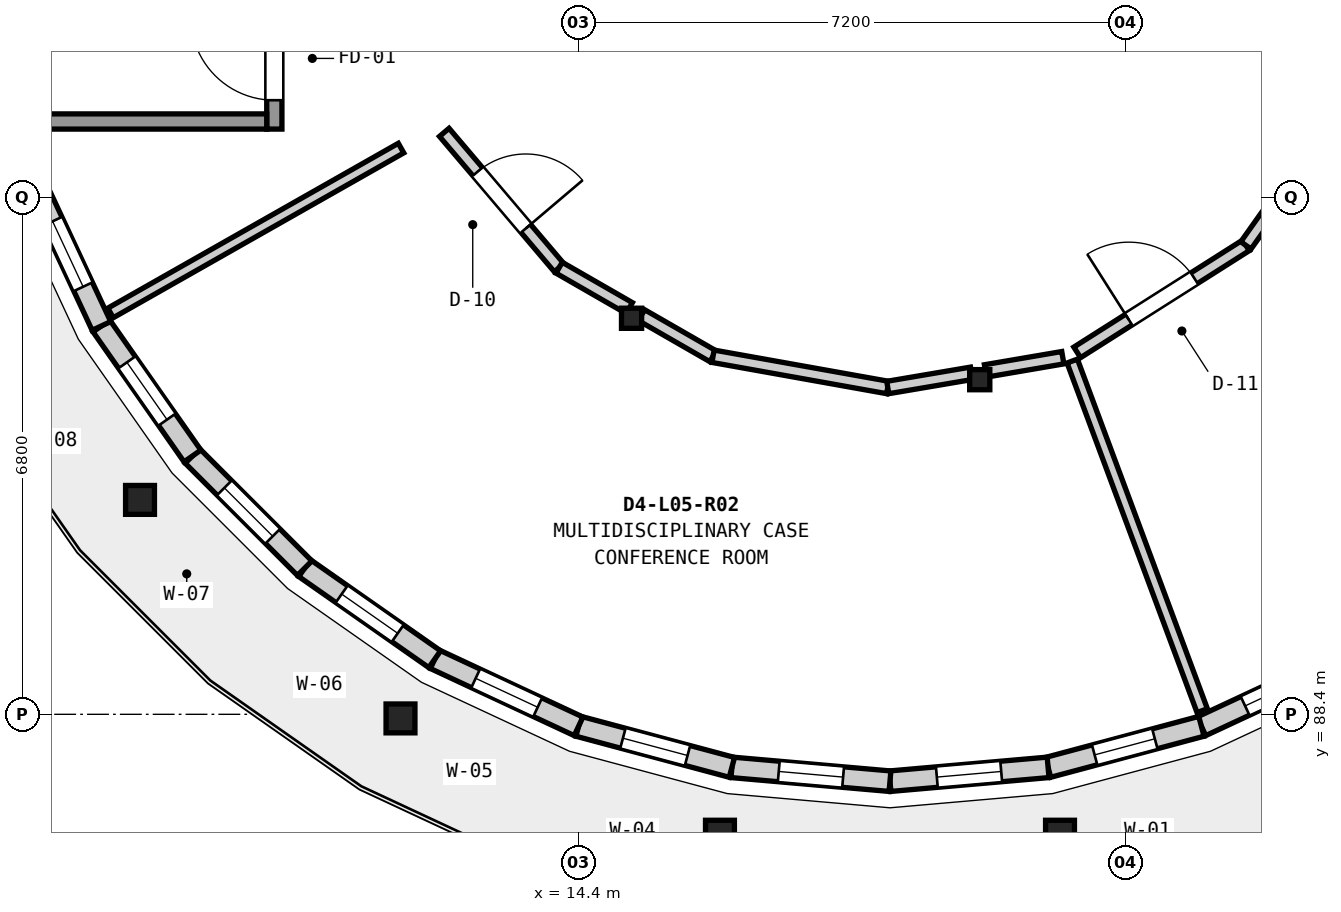
"""IFC4 building model, lengths in metres.
Left out: names, types, materials, properties, quantities, classifications, styles, units other than length and angle.
Written with IfcOpenShell. Run it as: python <this file> out.ifc"""

import sys

from ifc_helpers import new_model, si_unit, direction, frame, frame_2d, origin, origin_2d, place, context, subcontext, project, spatial, rectangle, circle, extrude, element, fill, save


model = new_model("IFC4")
c1 = context("Model", 3, precision=1e-05, world=origin(), true_north=direction((0.0, 1.0)))
c2 = subcontext(c1, "Body", "Model", "MODEL_VIEW")
j1 = project(units=[si_unit("LENGTHUNIT", "METRE"), si_unit("PLANEANGLEUNIT", "RADIAN")], contexts=[c1])
p1 = place(None, origin())
s1 = spatial("IfcSite", under=j1, at=p1, CompositionType="ELEMENT")
p2 = place(p1, origin())
s2 = spatial("IfcBuilding", under=s1, at=p2, CompositionType="ELEMENT")
p3 = place(p2, frame((0.0, 0.0, 21.35)))
s3 = spatial("IfcBuildingStorey", under=s2, at=p3, CompositionType="ELEMENT", Elevation=21.35)
for number, where, z_axis, x_axis in (
    (1, (8.633, 91.221, 0.0), (0.0, 0.0, 1.0), (1.0, 0.0, 0.0)),
    (2, (12.06, 88.346, 0.0), (0.0, 0.0, 1.0), (1.0, 0.0, 0.0)),
    (3, (16.263, 86.816, 0.0), (0.0, 0.0, 1.0), (1.0, 0.0, 0.0)),
    (4, (20.737, 86.816, 0.0), (0.0, 0.0, 1.0), (1.0, 0.0, 0.0)),
):
    element("IfcColumn", number, at=place(p3, frame(where, z_axis=z_axis, x_axis=x_axis)), inside=s3, PredefinedType="PILASTER", context=c2, shape_type="SweptSolid", body=[
        extrude(circle(Radius=0.19, at=origin_2d()), origin(), (0.0, 0.0, 1.0), 4.2),
    ])
for number, where, z_axis, x_axis in (
    (5, (15.1, 93.611, 0.0), (0.0, 0.0, 1.0), (1.0, 0.0, 0.0)),
    (6, (19.681, 92.803, 0.0), (0.0, 0.0, 1.0), (1.0, 0.0, 0.0)),
):
    element("IfcColumn", number, at=place(p3, frame(where, z_axis=z_axis, x_axis=x_axis)), inside=s3, PredefinedType="COLUMN", context=c2, shape_type="SweptSolid", body=[
        extrude(rectangle(XDim=0.265, YDim=0.265, at=origin_2d()), origin(), (0.0, 0.0, 1.0), 4.2),
    ])
p4 = place(p3, frame((24.49, 89.125, 0.0), z_axis=(0.0, 0.0, 1.0), x_axis=(-0.906251803004, -0.422738299131, 0.0)))
e7 = element("IfcWall", 7, at=p4, inside=s3, PredefinedType="ELEMENTEDWALL", context=c2, shape_type="SweptSolid", body=[
    extrude(rectangle(XDim=2.089, YDim=0.27, at=frame_2d((1.044, 0.0))), origin(), (0.0, 0.0, 1.0), 3.314),
])
p5 = place(p4, frame((0.634, 0.0, 0.85)))
e8 = element("IfcOpeningElement", 8, at=p5, cuts=e7, PredefinedType="OPENING", context=c2, shape_type="SweptSolid", body=[
    extrude(rectangle(XDim=0.82, YDim=1.45, at=frame_2d((0.41, 0.725))), frame((0.0, 0.145, 0.0), z_axis=(0.0, -1.0, 0.0), x_axis=(1.0, 0.0, 0.0)), (0.0, 0.0, 1.0), 0.29),
])
p6 = place(p3, frame((22.597, 88.242, 0.0), z_axis=(0.0, 0.0, 1.0), x_axis=(-0.965970487849, -0.258652308331, 0.0)))
e9 = element("IfcWall", 9, at=p6, inside=s3, PredefinedType="ELEMENTEDWALL", context=c2, shape_type="SweptSolid", body=[
    extrude(rectangle(XDim=2.088, YDim=0.27, at=frame_2d((1.044, 0.0))), origin(), (0.0, 0.0, 1.0), 3.314),
])
p7 = place(p6, frame((0.634, 0.0, 0.85)))
e10 = element("IfcOpeningElement", 10, at=p7, cuts=e9, PredefinedType="OPENING", context=c2, shape_type="SweptSolid", body=[
    extrude(rectangle(XDim=0.82, YDim=1.45, at=frame_2d((0.41, 0.725))), frame((0.0, 0.145, 0.0), z_axis=(0.0, -1.0, 0.0), x_axis=(1.0, 0.0, 0.0)), (0.0, 0.0, 1.0), 0.29),
])
p8 = place(p3, frame((20.58, 87.702, 0.0), z_axis=(0.0, 0.0, 1.0), x_axis=(-0.996198792396, -0.087108931964, 0.0)))
e11 = element("IfcWall", 11, at=p8, inside=s3, PredefinedType="ELEMENTEDWALL", context=c2, shape_type="SweptSolid", body=[
    extrude(rectangle(XDim=2.088, YDim=0.27, at=frame_2d((1.044, 0.0))), origin(), (0.0, 0.0, 1.0), 3.314),
])
p9 = place(p8, frame((0.619, 0.0, 0.85)))
e12 = element("IfcOpeningElement", 12, at=p9, cuts=e11, PredefinedType="OPENING", context=c2, shape_type="SweptSolid", body=[
    extrude(rectangle(XDim=0.85, YDim=1.5, at=frame_2d((0.425, 0.75))), frame((0.0, 0.145, 0.0), z_axis=(0.0, -1.0, 0.0), x_axis=(1.0, 0.0, 0.0)), (0.0, 0.0, 1.0), 0.29),
])
p10 = place(p3, frame((18.5, 87.52, 0.0), z_axis=(0.0, 0.0, 1.0), x_axis=(-0.996198792396, 0.087108931964, 0.0)))
e13 = element("IfcWall", 13, at=p10, inside=s3, PredefinedType="ELEMENTEDWALL", context=c2, shape_type="SweptSolid", body=[
    extrude(rectangle(XDim=2.088, YDim=0.27, at=frame_2d((1.044, 0.0))), origin(), (0.0, 0.0, 1.0), 3.314),
])
p11 = place(p10, frame((0.619, 0.0, 0.85)))
e14 = element("IfcOpeningElement", 14, at=p11, cuts=e13, PredefinedType="OPENING", context=c2, shape_type="SweptSolid", body=[
    extrude(rectangle(XDim=0.85, YDim=1.75, at=frame_2d((0.425, 0.875))), frame((0.0, 0.145, 0.0), z_axis=(0.0, -1.0, 0.0), x_axis=(1.0, 0.0, 0.0)), (0.0, 0.0, 1.0), 0.29),
])
p12 = place(p3, frame((16.42, 87.702, 0.0), z_axis=(0.0, 0.0, 1.0), x_axis=(-0.965970487849, 0.258652308331, 0.0)))
e15 = element("IfcWall", 15, at=p12, inside=s3, PredefinedType="ELEMENTEDWALL", context=c2, shape_type="SweptSolid", body=[
    extrude(rectangle(XDim=2.088, YDim=0.27, at=frame_2d((1.044, 0.0))), origin(), (0.0, 0.0, 1.0), 3.314),
])
p13 = place(p12, frame((0.604, 0.0, 0.85)))
e16 = element("IfcOpeningElement", 16, at=p13, cuts=e15, PredefinedType="OPENING", context=c2, shape_type="SweptSolid", body=[
    extrude(rectangle(XDim=0.88, YDim=1.6, at=frame_2d((0.44, 0.8))), frame((0.0, 0.145, 0.0), z_axis=(0.0, -1.0, 0.0), x_axis=(1.0, 0.0, 0.0)), (0.0, 0.0, 1.0), 0.29),
])
p14 = place(p3, frame((14.403, 88.242, 0.0), z_axis=(0.0, 0.0, 1.0), x_axis=(-0.906251803004, 0.422738299131, 0.0)))
e17 = element("IfcWall", 17, at=p14, inside=s3, PredefinedType="ELEMENTEDWALL", context=c2, shape_type="SweptSolid", body=[
    extrude(rectangle(XDim=2.089, YDim=0.27, at=frame_2d((1.044, 0.0))), origin(), (0.0, 0.0, 1.0), 3.314),
])
p15 = place(p14, frame((0.594, 0.0, 0.85)))
e18 = element("IfcOpeningElement", 18, at=p15, cuts=e17, PredefinedType="OPENING", context=c2, shape_type="SweptSolid", body=[
    extrude(rectangle(XDim=0.9, YDim=1.4, at=frame_2d((0.45, 0.7))), frame((0.0, 0.145, 0.0), z_axis=(0.0, -1.0, 0.0), x_axis=(1.0, 0.0, 0.0)), (0.0, 0.0, 1.0), 0.29),
])
p16 = place(p3, frame((12.51, 89.125, 0.0), z_axis=(0.0, 0.0, 1.0), x_axis=(-0.819155033433, 0.573572167388, 0.0)))
e19 = element("IfcWall", 19, at=p16, inside=s3, PredefinedType="ELEMENTEDWALL", context=c2, shape_type="SweptSolid", body=[
    extrude(rectangle(XDim=2.089, YDim=0.27, at=frame_2d((1.044, 0.0))), origin(), (0.0, 0.0, 1.0), 3.314),
])
p17 = place(p16, frame((0.594, 0.0, 0.85)))
e20 = element("IfcOpeningElement", 20, at=p17, cuts=e19, PredefinedType="OPENING", context=c2, shape_type="SweptSolid", body=[
    extrude(rectangle(XDim=0.9, YDim=1.65, at=frame_2d((0.45, 0.825))), frame((0.0, 0.145, 0.0), z_axis=(0.0, -1.0, 0.0), x_axis=(1.0, 0.0, 0.0)), (0.0, 0.0, 1.0), 0.29),
])
p18 = place(p3, frame((10.799, 90.323, 0.0), z_axis=(0.0, 0.0, 1.0), x_axis=(-0.707106781187, 0.707106781187, 0.0)))
e21 = element("IfcWall", 21, at=p18, inside=s3, PredefinedType="ELEMENTEDWALL", context=c2, shape_type="SweptSolid", body=[
    extrude(rectangle(XDim=2.087, YDim=0.27, at=frame_2d((1.044, 0.0))), origin(), (0.0, 0.0, 1.0), 3.314),
])
p19 = place(p18, frame((0.594, 0.0, 0.85)))
e22 = element("IfcOpeningElement", 22, at=p19, cuts=e21, PredefinedType="OPENING", context=c2, shape_type="SweptSolid", body=[
    extrude(rectangle(XDim=0.9, YDim=1.9, at=frame_2d((0.45, 0.95))), frame((0.0, 0.145, 0.0), z_axis=(0.0, -1.0, 0.0), x_axis=(1.0, 0.0, 0.0)), (0.0, 0.0, 1.0), 0.29),
])
p20 = place(p3, frame((9.323, 91.799, 0.0), z_axis=(0.0, 0.0, 1.0), x_axis=(-0.573572167388, 0.819155033433, 0.0)))
e23 = element("IfcWall", 23, at=p20, inside=s3, PredefinedType="ELEMENTEDWALL", context=c2, shape_type="SweptSolid", body=[
    extrude(rectangle(XDim=2.089, YDim=0.27, at=frame_2d((1.044, 0.0))), origin(), (0.0, 0.0, 1.0), 3.314),
])
p21 = place(p20, frame((0.584, 0.0, 0.85)))
e24 = element("IfcOpeningElement", 24, at=p21, cuts=e23, PredefinedType="OPENING", context=c2, shape_type="SweptSolid", body=[
    extrude(rectangle(XDim=0.92, YDim=1.55, at=frame_2d((0.46, 0.775))), frame((0.0, 0.145, 0.0), z_axis=(0.0, -1.0, 0.0), x_axis=(1.0, 0.0, 0.0)), (0.0, 0.0, 1.0), 0.29),
])
p22 = place(p3, frame((8.125, 93.51, 0.0), z_axis=(0.0, 0.0, 1.0), x_axis=(-0.422738299131, 0.906251803004, 0.0)))
e25 = element("IfcWall", 25, at=p22, inside=s3, PredefinedType="ELEMENTEDWALL", context=c2, shape_type="SweptSolid", body=[
    extrude(rectangle(XDim=2.089, YDim=0.27, at=frame_2d((1.044, 0.0))), origin(), (0.0, 0.0, 1.0), 3.314),
])
p23 = place(p22, frame((0.569, 0.0, 0.85)))
e26 = element("IfcOpeningElement", 26, at=p23, cuts=e25, PredefinedType="OPENING", context=c2, shape_type="SweptSolid", body=[
    extrude(rectangle(XDim=0.95, YDim=1.35, at=frame_2d((0.475, 0.675))), frame((0.0, 0.145, 0.0), z_axis=(0.0, -1.0, 0.0), x_axis=(1.0, 0.0, 0.0)), (0.0, 0.0, 1.0), 0.29),
])
p24 = place(p3, frame((10.4, 96.1, 0.0), z_axis=(0.0, 0.0, 1.0), x_axis=(0.0, 1.0, 0.0)))
e27 = element("IfcWall", 27, at=p24, inside=s3, PredefinedType="SHEAR", context=c2, shape_type="SweptSolid", body=[
    extrude(rectangle(XDim=6.8, YDim=0.2, at=frame_2d((3.4, 0.0))), origin(), (0.0, 0.0, 1.0), 3.96),
])
p25 = place(p24, frame((0.38, 0.0, 0.0)))
e28 = element("IfcOpeningElement", 28, at=p25, cuts=e27, PredefinedType="OPENING", context=c2, shape_type="SweptSolid", body=[
    extrude(rectangle(XDim=1.1, YDim=2.15, at=frame_2d((0.55, 1.075))), frame((0.0, 0.11, 0.0), z_axis=(0.0, -1.0, 0.0), x_axis=(1.0, 0.0, 0.0)), (0.0, 0.0, 1.0), 0.22),
])
p26 = place(p3, frame((10.3, 96.2, 0.0), z_axis=(0.0, 0.0, 1.0), x_axis=(-1.0, 0.0, 0.0)))
e29 = element("IfcWall", 29, at=p26, inside=s3, PredefinedType="SHEAR", context=c2, shape_type="SweptSolid", body=[
    extrude(rectangle(XDim=2.9, YDim=0.2, at=frame_2d((1.45, 0.0))), origin(), (0.0, 0.0, 1.0), 3.96),
])
p27 = place(p3, frame((12.067, 95.85, 0.0), z_axis=(0.0, 0.0, 1.0), x_axis=(-0.869678824808, -0.493618011909, 0.0)))
e30 = element("IfcWall", 30, at=p27, inside=s3, PredefinedType="PARTITIONING", context=c2, shape_type="SweptSolid", body=[
    extrude(rectangle(XDim=4.395, YDim=0.145, at=frame_2d((2.197, 0.0))), origin(), (0.0, 0.0, 1.0), 3.279),
])
p28 = place(p3, frame((20.898, 93.048, 0.0), z_axis=(0.0, 0.0, 1.0), x_axis=(0.348428829985, -0.937335239088, 0.0)))
e31 = element("IfcWall", 31, at=p28, inside=s3, PredefinedType="PARTITIONING", context=c2, shape_type="SweptSolid", body=[
    extrude(rectangle(XDim=4.908, YDim=0.145, at=frame_2d((2.454, 0.0))), origin(), (0.0, 0.0, 1.0), 3.279),
])
p29 = place(p3, frame((12.636, 96.057, 0.0), z_axis=(0.0, 0.0, 1.0), x_axis=(0.646935088341, -0.762545075044, 0.0)))
e32 = element("IfcWall", 32, at=p29, inside=s3, PredefinedType="PARTITIONING", context=c2, shape_type="SweptSolid", body=[
    extrude(rectangle(XDim=2.336, YDim=0.165, at=frame_2d((1.168, 0.0))), origin(), (0.0, 0.0, 1.0), 3.279),
])
p30 = place(p29, frame((0.678, 0.0, 0.0)))
e33 = element("IfcOpeningElement", 33, at=p30, cuts=e32, PredefinedType="OPENING", context=c2, shape_type="SweptSolid", body=[
    extrude(rectangle(XDim=0.98, YDim=2.24, at=frame_2d((0.49, 1.12))), frame((0.0, 0.093, 0.0), z_axis=(0.0, -1.0, 0.0), x_axis=(1.0, 0.0, 0.0)), (0.0, 0.0, 1.0), 0.185),
])
p31 = place(p3, frame((14.147, 94.276, 0.0), z_axis=(0.0, 0.0, 1.0), x_axis=(0.866913733882, -0.498458200862, 0.0)))
e34 = element("IfcWall", 34, at=p31, inside=s3, PredefinedType="PARTITIONING", context=c2, shape_type="SweptSolid", body=[
    extrude(rectangle(XDim=1.065, YDim=0.165, at=frame_2d((0.532, 0.0))), origin(), (0.0, 0.0, 1.0), 3.279),
])
p32 = place(p3, frame((15.231, 93.652, 0.0), z_axis=(0.0, 0.0, 1.0), x_axis=(0.866967036006, -0.498365486846, 0.0)))
e35 = element("IfcWall", 35, at=p32, inside=s3, PredefinedType="PARTITIONING", context=c2, shape_type="SweptSolid", body=[
    extrude(rectangle(XDim=1.086, YDim=0.165, at=frame_2d((0.543, 0.0))), origin(), (0.0, 0.0, 1.0), 3.279),
])
p33 = place(p3, frame((16.172, 93.111, 0.0), z_axis=(0.0, 0.0, 1.0), x_axis=(0.984381019853, -0.176051150959, 0.0)))
e36 = element("IfcWall", 36, at=p33, inside=s3, PredefinedType="PARTITIONING", context=c2, shape_type="SweptSolid", body=[
    extrude(rectangle(XDim=2.335, YDim=0.165, at=frame_2d((1.167, 0.0))), origin(), (0.0, 0.0, 1.0), 3.279),
])
p34 = place(p3, frame((18.471, 92.7, 0.0), z_axis=(0.0, 0.0, 1.0), x_axis=(0.985905603064, 0.167302545846, 0.0)))
e37 = element("IfcWall", 37, at=p34, inside=s3, PredefinedType="PARTITIONING", context=c2, shape_type="SweptSolid", body=[
    extrude(rectangle(XDim=1.118, YDim=0.165, at=frame_2d((0.559, 0.0))), origin(), (0.0, 0.0, 1.0), 3.279),
])
p35 = place(p3, frame((19.756, 92.918, 0.0), z_axis=(0.0, 0.0, 1.0), x_axis=(0.98568855246, 0.168576622189, 0.0)))
e38 = element("IfcWall", 38, at=p35, inside=s3, PredefinedType="PARTITIONING", context=c2, shape_type="SweptSolid", body=[
    extrude(rectangle(XDim=1.033, YDim=0.165, at=frame_2d((0.516, 0.0))), origin(), (0.0, 0.0, 1.0), 3.279),
])
p36 = place(p3, frame((20.963, 93.162, 0.0), z_axis=(0.0, 0.0, 1.0), x_axis=(0.844505505294, 0.535546871457, 0.0)))
e39 = element("IfcWall", 39, at=p36, inside=s3, PredefinedType="PARTITIONING", context=c2, shape_type="SweptSolid", body=[
    extrude(rectangle(XDim=2.629, YDim=0.165, at=frame_2d((1.314, 0.0))), origin(), (0.0, 0.0, 1.0), 3.279),
])
p37 = place(p36, frame((0.804, 0.0, 0.0)))
e40 = element("IfcOpeningElement", 40, at=p37, cuts=e39, PredefinedType="OPENING", context=c2, shape_type="SweptSolid", body=[
    extrude(rectangle(XDim=1.02, YDim=2.26, at=frame_2d((0.51, 1.13))), frame((0.0, 0.093, 0.0), z_axis=(0.0, -1.0, 0.0), x_axis=(1.0, 0.0, 0.0)), (0.0, 0.0, 1.0), 0.185),
])
p38 = place(p3, frame((23.183, 94.57, 0.0), z_axis=(0.0, 0.0, 1.0), x_axis=(0.578863935342, 0.815424149974, 0.0)))
e41 = element("IfcWall", 41, at=p38, inside=s3, PredefinedType="PARTITIONING", context=c2, shape_type="SweptSolid", body=[
    extrude(rectangle(XDim=0.672, YDim=0.165, at=frame_2d((0.336, 0.0))), origin(), (0.0, 0.0, 1.0), 3.279),
])
p39 = place(p5, origin())
e42 = element("IfcWindow", 42, at=p39, inside=s3, PartitioningType="SINGLE_PANEL", PredefinedType="WINDOW", context=c2, shape_type="SweptSolid", body=[
    extrude(rectangle(XDim=0.82, YDim=1.45, at=frame_2d((0.41, 0.725))), frame((0.0, 0.03, 0.0), z_axis=(0.0, -1.0, 0.0), x_axis=(1.0, 0.0, 0.0)), (0.0, 0.0, 1.0), 0.06),
])
fill(e8, e42)
p40 = place(p7, origin())
e43 = element("IfcWindow", 43, at=p40, inside=s3, PartitioningType="SINGLE_PANEL", PredefinedType="WINDOW", context=c2, shape_type="SweptSolid", body=[
    extrude(rectangle(XDim=0.82, YDim=1.45, at=frame_2d((0.41, 0.725))), frame((0.0, 0.03, 0.0), z_axis=(0.0, -1.0, 0.0), x_axis=(1.0, 0.0, 0.0)), (0.0, 0.0, 1.0), 0.06),
])
fill(e10, e43)
p41 = place(p9, origin())
e44 = element("IfcWindow", 44, at=p41, inside=s3, PartitioningType="SINGLE_PANEL", PredefinedType="WINDOW", context=c2, shape_type="SweptSolid", body=[
    extrude(rectangle(XDim=0.85, YDim=1.5, at=frame_2d((0.425, 0.75))), frame((0.0, 0.03, 0.0), z_axis=(0.0, -1.0, 0.0), x_axis=(1.0, 0.0, 0.0)), (0.0, 0.0, 1.0), 0.06),
])
fill(e12, e44)
p42 = place(p11, origin())
e45 = element("IfcWindow", 45, at=p42, inside=s3, PartitioningType="SINGLE_PANEL", PredefinedType="WINDOW", context=c2, shape_type="SweptSolid", body=[
    extrude(rectangle(XDim=0.85, YDim=1.75, at=frame_2d((0.425, 0.875))), frame((0.0, 0.03, 0.0), z_axis=(0.0, -1.0, 0.0), x_axis=(1.0, 0.0, 0.0)), (0.0, 0.0, 1.0), 0.06),
])
fill(e14, e45)
p43 = place(p13, origin())
e46 = element("IfcWindow", 46, at=p43, inside=s3, PartitioningType="SINGLE_PANEL", PredefinedType="WINDOW", context=c2, shape_type="SweptSolid", body=[
    extrude(rectangle(XDim=0.88, YDim=1.6, at=frame_2d((0.44, 0.8))), frame((0.0, 0.03, 0.0), z_axis=(0.0, -1.0, 0.0), x_axis=(1.0, 0.0, 0.0)), (0.0, 0.0, 1.0), 0.06),
])
fill(e16, e46)
p44 = place(p15, origin())
e47 = element("IfcWindow", 47, at=p44, inside=s3, PartitioningType="SINGLE_PANEL", PredefinedType="WINDOW", context=c2, shape_type="SweptSolid", body=[
    extrude(rectangle(XDim=0.9, YDim=1.4, at=frame_2d((0.45, 0.7))), frame((0.0, 0.03, 0.0), z_axis=(0.0, -1.0, 0.0), x_axis=(1.0, 0.0, 0.0)), (0.0, 0.0, 1.0), 0.06),
])
fill(e18, e47)
p45 = place(p17, origin())
e48 = element("IfcWindow", 48, at=p45, inside=s3, PartitioningType="SINGLE_PANEL", PredefinedType="WINDOW", context=c2, shape_type="SweptSolid", body=[
    extrude(rectangle(XDim=0.9, YDim=1.65, at=frame_2d((0.45, 0.825))), frame((0.0, 0.03, 0.0), z_axis=(0.0, -1.0, 0.0), x_axis=(1.0, 0.0, 0.0)), (0.0, 0.0, 1.0), 0.06),
])
fill(e20, e48)
p46 = place(p19, origin())
e49 = element("IfcWindow", 49, at=p46, inside=s3, PartitioningType="SINGLE_PANEL", PredefinedType="WINDOW", context=c2, shape_type="SweptSolid", body=[
    extrude(rectangle(XDim=0.9, YDim=1.9, at=frame_2d((0.45, 0.95))), frame((0.0, 0.03, 0.0), z_axis=(0.0, -1.0, 0.0), x_axis=(1.0, 0.0, 0.0)), (0.0, 0.0, 1.0), 0.06),
])
fill(e22, e49)
p47 = place(p21, origin())
e50 = element("IfcWindow", 50, at=p47, inside=s3, PartitioningType="SINGLE_PANEL", PredefinedType="WINDOW", context=c2, shape_type="SweptSolid", body=[
    extrude(rectangle(XDim=0.92, YDim=1.55, at=frame_2d((0.46, 0.775))), frame((0.0, 0.03, 0.0), z_axis=(0.0, -1.0, 0.0), x_axis=(1.0, 0.0, 0.0)), (0.0, 0.0, 1.0), 0.06),
])
fill(e24, e50)
p48 = place(p23, origin())
e51 = element("IfcWindow", 51, at=p48, inside=s3, PartitioningType="SINGLE_PANEL", PredefinedType="WINDOW", context=c2, shape_type="SweptSolid", body=[
    extrude(rectangle(XDim=0.95, YDim=1.35, at=frame_2d((0.475, 0.675))), frame((0.0, 0.03, 0.0), z_axis=(0.0, -1.0, 0.0), x_axis=(1.0, 0.0, 0.0)), (0.0, 0.0, 1.0), 0.06),
])
fill(e26, e51)
p49 = place(p25, origin())
e52 = element("IfcDoor", 52, at=p49, inside=s3, OperationType="SINGLE_SWING_RIGHT", PredefinedType="DOOR", context=c2, shape_type="SweptSolid", body=[
    extrude(rectangle(XDim=1.1, YDim=2.15, at=frame_2d((0.55, 1.075))), frame((0.0, 0.025, 0.0), z_axis=(0.0, -1.0, 0.0), x_axis=(1.0, 0.0, 0.0)), (0.0, 0.0, 1.0), 0.05),
])
fill(e28, e52)
p50 = place(p30, origin())
e53 = element("IfcDoor", 53, at=p50, inside=s3, OperationType="SINGLE_SWING_RIGHT", PredefinedType="DOOR", context=c2, shape_type="SweptSolid", body=[
    extrude(rectangle(XDim=0.98, YDim=2.24, at=frame_2d((0.49, 1.12))), frame((0.0, 0.025, 0.0), z_axis=(0.0, -1.0, 0.0), x_axis=(1.0, 0.0, 0.0)), (0.0, 0.0, 1.0), 0.05),
])
fill(e33, e53)
p51 = place(p37, origin())
e54 = element("IfcDoor", 54, at=p51, inside=s3, OperationType="SINGLE_SWING_LEFT", PredefinedType="DOOR", context=c2, shape_type="SweptSolid", body=[
    extrude(rectangle(XDim=1.02, YDim=2.26, at=frame_2d((0.51, 1.13))), frame((0.0, 0.025, 0.0), z_axis=(0.0, -1.0, 0.0), x_axis=(1.0, 0.0, 0.0)), (0.0, 0.0, 1.0), 0.05),
])
fill(e40, e54)
save(model, sys.argv[1])
